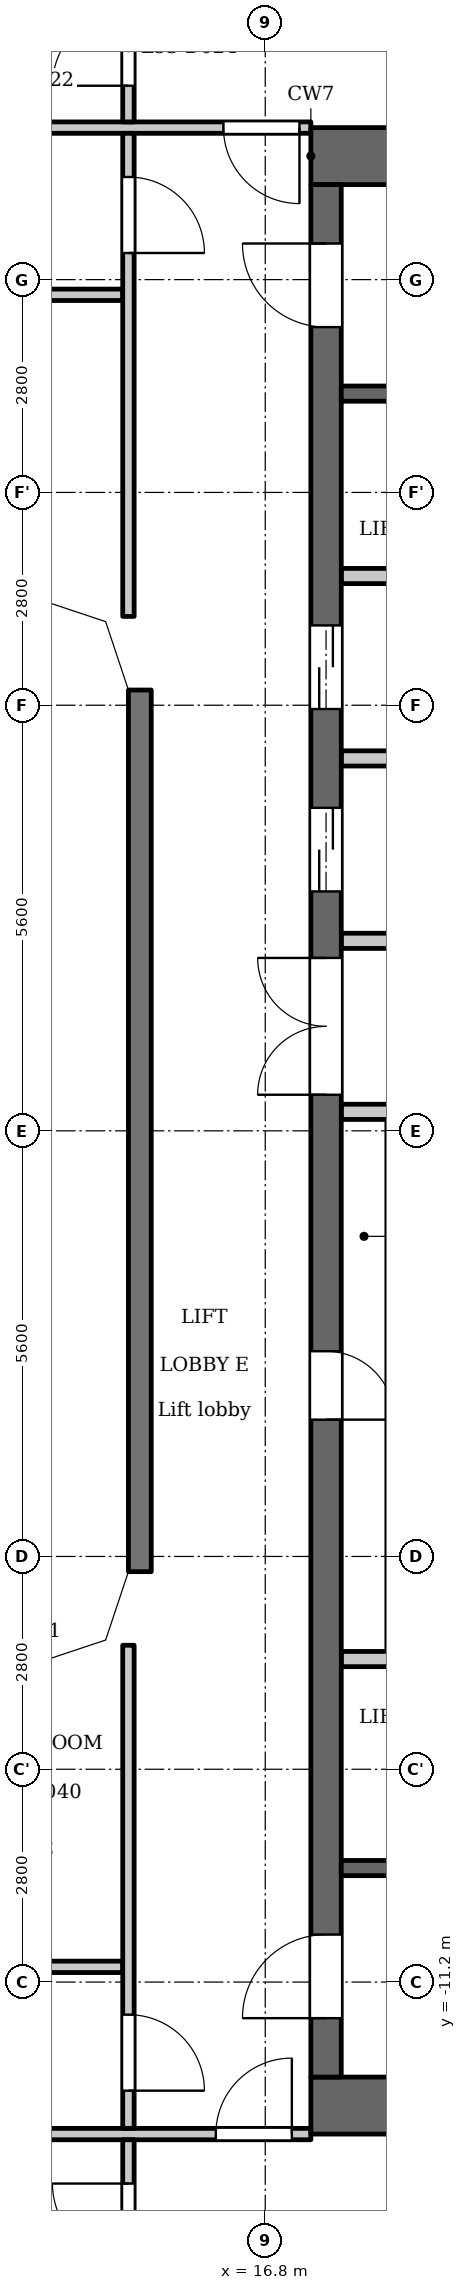
"""IFC4 building model, lengths in metres.
Left out: names, types, materials, properties, quantities, classifications, styles, units other than length and angle.
Written with IfcOpenShell. Run it as: python <this file> out.ifc"""

import sys

from ifc_helpers import new_model, si_unit, direction, frame, frame_2d, origin, place, context, subcontext, project, spatial, polyline, rectangle, outline, extrude, element, fill, save


model = new_model("IFC4")
c1 = context("Model", 3, precision=1e-05, world=origin(), true_north=direction((0.0, 1.0)))
c2 = subcontext(c1, "Body", "Model", "MODEL_VIEW")
j1 = project(units=[si_unit("LENGTHUNIT", "METRE"), si_unit("PLANEANGLEUNIT", "RADIAN")], contexts=[c1])
p1 = place(None, origin())
s1 = spatial("IfcSite", under=j1, at=p1, CompositionType="ELEMENT")
p2 = place(p1, origin())
s2 = spatial("IfcBuilding", under=s1, at=p2, CompositionType="ELEMENT")
p3 = place(p2, frame((0.0, 0.0, 206.4)))
s3 = spatial("IfcBuildingStorey", under=s2, at=p3, CompositionType="ELEMENT", Elevation=206.4)
p4 = place(p3, frame((15.15, 5.8, 0.0), z_axis=(0.0, 0.0, 1.0), x_axis=(0.0, -1.0, 0.0)))
e1 = element("IfcWall", 1, at=p4, inside=s3, PredefinedType="SOLIDWALL", context=c2, shape_type="SweptSolid", body=[
    extrude(rectangle(XDim=11.6, YDim=0.3, at=frame_2d((5.8, 0.0))), origin(), (0.0, 0.0, 1.0), 3.2),
])
for number, where, z_axis, x_axis in (
    (2, (17.4, 12.825, 0.0), (0.0, 0.0, 1.0), (1.0, 0.0, 0.0)),
    (3, (17.4, -12.825, 0.0), (0.0, 0.0, 1.0), (1.0, 0.0, 0.0)),
):
    element("IfcWall", number, at=place(p3, frame(where, z_axis=z_axis, x_axis=x_axis)), inside=s3, PredefinedType="SHEAR", context=c2, shape_type="SweptSolid", body=[
        extrude(rectangle(XDim=7.6, YDim=0.75, at=frame_2d((3.8, 0.0))), origin(), (0.0, 0.0, 1.0), 3.2),
    ])
p5 = place(p3, frame((17.6, -12.45, 0.0), z_axis=(0.0, 0.0, 1.0), x_axis=(0.0, 1.0, 0.0)))
e4 = element("IfcWall", 4, at=p5, inside=s3, PredefinedType="SHEAR", context=c2, shape_type="SweptSolid", body=[
    extrude(rectangle(XDim=24.9, YDim=0.4, at=frame_2d((12.45, 0.0))), origin(), (0.0, 0.0, 1.0), 3.2),
])
p6 = place(p5, frame((8.65, 0.0, 0.0)))
e5 = element("IfcOpeningElement", 5, at=p6, cuts=e4, PredefinedType="OPENING", context=c2, shape_type="SweptSolid", body=[
    extrude(rectangle(XDim=0.9, YDim=2.1, at=frame_2d((0.45, 1.05))), frame((0.0, 0.21, 0.0), z_axis=(0.0, -1.0, 0.0), x_axis=(1.0, 0.0, 0.0)), (0.0, 0.0, 1.0), 0.42),
])
p7 = place(p5, frame((15.6, 0.0, 0.0)))
e6 = element("IfcOpeningElement", 6, at=p7, cuts=e4, PredefinedType="OPENING", context=c2, shape_type="SweptSolid", body=[
    extrude(rectangle(XDim=1.1, YDim=2.1, at=frame_2d((0.55, 1.05))), frame((0.0, 0.21, 0.0), z_axis=(0.0, -1.0, 0.0), x_axis=(1.0, 0.0, 0.0)), (0.0, 0.0, 1.0), 0.42),
])
p8 = place(p5, frame((18.0, 0.0, 0.0)))
e7 = element("IfcOpeningElement", 7, at=p8, cuts=e4, PredefinedType="OPENING", context=c2, shape_type="SweptSolid", body=[
    extrude(rectangle(XDim=1.1, YDim=2.1, at=frame_2d((0.55, 1.05))), frame((0.0, 0.21, 0.0), z_axis=(0.0, -1.0, 0.0), x_axis=(1.0, 0.0, 0.0)), (0.0, 0.0, 1.0), 0.42),
])
p9 = place(p5, frame((23.025, 0.0, 0.0)))
e8 = element("IfcOpeningElement", 8, at=p9, cuts=e4, PredefinedType="OPENING", context=c2, shape_type="SweptSolid", body=[
    extrude(rectangle(XDim=1.1, YDim=2.1, at=frame_2d((0.55, 1.05))), frame((0.0, 0.21, 0.0), z_axis=(0.0, -1.0, 0.0), x_axis=(1.0, 0.0, 0.0)), (0.0, 0.0, 1.0), 0.42),
])
p10 = place(p5, frame((0.775, 0.0, 0.0)))
e9 = element("IfcOpeningElement", 9, at=p10, cuts=e4, PredefinedType="OPENING", context=c2, shape_type="SweptSolid", body=[
    extrude(rectangle(XDim=1.1, YDim=2.1, at=frame_2d((0.55, 1.05))), frame((0.0, 0.21, 0.0), z_axis=(0.0, -1.0, 0.0), x_axis=(1.0, 0.0, 0.0)), (0.0, 0.0, 1.0), 0.42),
])
p11 = place(p5, frame((12.925, 0.0, 0.0)))
e10 = element("IfcOpeningElement", 10, at=p11, cuts=e4, PredefinedType="OPENING", context=c2, shape_type="SweptSolid", body=[
    extrude(rectangle(XDim=1.8, YDim=2.1, at=frame_2d((0.9, 1.05))), frame((0.0, 0.21, 0.0), z_axis=(0.0, -1.0, 0.0), x_axis=(1.0, 0.0, 0.0)), (0.0, 0.0, 1.0), 0.42),
])
p12 = place(p3, frame((17.8, -9.7, 0.0), z_axis=(0.0, 0.0, 1.0), x_axis=(1.0, 0.0, 0.0)))
e11 = element("IfcWall", 11, at=p12, inside=s3, PredefinedType="SHEAR", context=c2, shape_type="SweptSolid", body=[
    extrude(rectangle(XDim=5.65, YDim=0.2, at=frame_2d((2.825, 0.0))), origin(), (0.0, 0.0, 1.0), 3.2),
])
p13 = place(p12, frame((0.85, 0.0, 0.0)))
e12 = element("IfcOpeningElement", 12, at=p13, cuts=e11, PredefinedType="OPENING", context=c2, shape_type="SweptSolid", body=[
    extrude(rectangle(XDim=1.1, YDim=2.1, at=frame_2d((0.55, 1.05))), frame((0.0, 0.11, 0.0), z_axis=(0.0, -1.0, 0.0), x_axis=(1.0, 0.0, 0.0)), (0.0, 0.0, 1.0), 0.22),
])
p14 = place(p12, frame((3.75, 0.0, 0.0)))
e13 = element("IfcOpeningElement", 13, at=p14, cuts=e11, PredefinedType="OPENING", context=c2, shape_type="SweptSolid", body=[
    extrude(rectangle(XDim=1.1, YDim=2.1, at=frame_2d((0.55, 1.05))), frame((0.0, 0.11, 0.0), z_axis=(0.0, -1.0, 0.0), x_axis=(1.0, 0.0, 0.0)), (0.0, 0.0, 1.0), 0.22),
])
p15 = place(p3, frame((17.8, -6.95, 0.0), z_axis=(0.0, 0.0, 1.0), x_axis=(1.0, 0.0, 0.0)))
e14 = element("IfcWall", 14, at=p15, inside=s3, PredefinedType="PARTITIONING", context=c2, shape_type="SweptSolid", body=[
    extrude(rectangle(XDim=2.8, YDim=0.2, at=frame_2d((1.4, 0.0))), origin(), (0.0, 0.0, 1.0), 3.2),
])
p16 = place(p3, frame((17.8, 0.25, 0.0), z_axis=(0.0, 0.0, 1.0), x_axis=(1.0, 0.0, 0.0)))
e15 = element("IfcWall", 15, at=p16, inside=s3, PredefinedType="PARTITIONING", context=c2, shape_type="SweptSolid", body=[
    extrude(rectangle(XDim=3.0, YDim=0.2, at=frame_2d((1.5, 0.0))), origin(), (0.0, 0.0, 1.0), 3.2),
])
p17 = place(p16, frame((1.35, 0.0, 0.0)))
e16 = element("IfcOpeningElement", 16, at=p17, cuts=e15, PredefinedType="OPENING", context=c2, shape_type="SweptSolid", body=[
    extrude(rectangle(XDim=0.9, YDim=2.1, at=frame_2d((0.45, 1.05))), frame((0.0, 0.11, 0.0), z_axis=(0.0, -1.0, 0.0), x_axis=(1.0, 0.0, 0.0)), (0.0, 0.0, 1.0), 0.22),
])
p18 = place(p3, frame((17.8, 2.5, 0.0), z_axis=(0.0, 0.0, 1.0), x_axis=(1.0, 0.0, 0.0)))
e17 = element("IfcWall", 17, at=p18, inside=s3, PredefinedType="PARTITIONING", context=c2, shape_type="SweptSolid", body=[
    extrude(rectangle(XDim=3.0, YDim=0.2, at=frame_2d((1.5, 0.0))), origin(), (0.0, 0.0, 1.0), 3.2),
])
for number, where, z_axis, x_axis in (
    (18, (17.8, 4.9, 0.0), (0.0, 0.0, 1.0), (1.0, 0.0, 0.0)),
    (19, (17.8, 7.3, 0.0), (0.0, 0.0, 1.0), (1.0, 0.0, 0.0)),
):
    element("IfcWall", number, at=place(p3, frame(where, z_axis=z_axis, x_axis=x_axis)), inside=s3, PredefinedType="PARTITIONING", context=c2, shape_type="SweptSolid", body=[
        extrude(rectangle(XDim=2.8, YDim=0.2, at=frame_2d((1.4, 0.0))), origin(), (0.0, 0.0, 1.0), 3.2),
    ])
p19 = place(p3, frame((17.8, 9.7, 0.0), z_axis=(0.0, 0.0, 1.0), x_axis=(1.0, 0.0, 0.0)))
e20 = element("IfcWall", 20, at=p19, inside=s3, PredefinedType="SHEAR", context=c2, shape_type="SweptSolid", body=[
    extrude(rectangle(XDim=5.65, YDim=0.2, at=frame_2d((2.825, 0.0))), origin(), (0.0, 0.0, 1.0), 3.2),
])
p20 = place(p19, frame((0.85, 0.0, 0.0)))
e21 = element("IfcOpeningElement", 21, at=p20, cuts=e20, PredefinedType="OPENING", context=c2, shape_type="SweptSolid", body=[
    extrude(rectangle(XDim=1.1, YDim=2.1, at=frame_2d((0.55, 1.05))), frame((0.0, 0.11, 0.0), z_axis=(0.0, -1.0, 0.0), x_axis=(1.0, 0.0, 0.0)), (0.0, 0.0, 1.0), 0.22),
])
p21 = place(p19, frame((3.75, 0.0, 0.0)))
e22 = element("IfcOpeningElement", 22, at=p21, cuts=e20, PredefinedType="OPENING", context=c2, shape_type="SweptSolid", body=[
    extrude(rectangle(XDim=1.1, YDim=2.1, at=frame_2d((0.55, 1.05))), frame((0.0, 0.11, 0.0), z_axis=(0.0, -1.0, 0.0), x_axis=(1.0, 0.0, 0.0)), (0.0, 0.0, 1.0), 0.22),
])
p22 = place(p3, frame((-17.4, -13.2, 0.0), z_axis=(0.0, 0.0, 1.0), x_axis=(1.0, 0.0, 0.0)))
e23 = element("IfcWall", 23, at=p22, inside=s3, PredefinedType="PARTITIONING", context=c2, shape_type="SweptSolid", body=[
    extrude(rectangle(XDim=34.8, YDim=0.15, at=frame_2d((17.4, 0.0))), origin(), (0.0, 0.0, 1.0), 3.2),
])
p23 = place(p22, frame((0.15, 0.0, 0.0)))
e24 = element("IfcOpeningElement", 24, at=p23, cuts=e23, PredefinedType="OPENING", context=c2, shape_type="SweptSolid", body=[
    extrude(rectangle(XDim=1.0, YDim=2.1, at=frame_2d((0.5, 1.05))), frame((0.0, 0.085, 0.0), z_axis=(0.0, -1.0, 0.0), x_axis=(1.0, 0.0, 0.0)), (0.0, 0.0, 1.0), 0.17),
])
p24 = place(p22, frame((33.55, 0.0, 0.0)))
e25 = element("IfcOpeningElement", 25, at=p24, cuts=e23, PredefinedType="OPENING", context=c2, shape_type="SweptSolid", body=[
    extrude(rectangle(XDim=1.0, YDim=2.1, at=frame_2d((0.5, 1.05))), frame((0.0, 0.085, 0.0), z_axis=(0.0, -1.0, 0.0), x_axis=(1.0, 0.0, 0.0)), (0.0, 0.0, 1.0), 0.17),
])
p25 = place(p3, frame((-14.925, -11.0, 0.0), z_axis=(0.0, 0.0, 1.0), x_axis=(1.0, 0.0, 0.0)))
e26 = element("IfcWall", 26, at=p25, inside=s3, PredefinedType="PARTITIONING", context=c2, shape_type="SweptSolid", body=[
    extrude(rectangle(XDim=29.85, YDim=0.15, at=frame_2d((14.925, 0.0))), origin(), (0.0, 0.0, 1.0), 3.2),
])
p26 = place(p25, frame((2.575, 0.0, 0.0)))
e27 = element("IfcOpeningElement", 27, at=p26, cuts=e26, PredefinedType="OPENING", context=c2, shape_type="SweptSolid", body=[
    extrude(rectangle(XDim=1.0, YDim=2.1, at=frame_2d((0.5, 1.05))), frame((0.0, 0.085, 0.0), z_axis=(0.0, -1.0, 0.0), x_axis=(1.0, 0.0, 0.0)), (0.0, 0.0, 1.0), 0.17),
])
p27 = place(p25, frame((26.375, 0.0, 0.0)))
e28 = element("IfcOpeningElement", 28, at=p27, cuts=e26, PredefinedType="OPENING", context=c2, shape_type="SweptSolid", body=[
    extrude(rectangle(XDim=1.0, YDim=2.1, at=frame_2d((0.5, 1.05))), frame((0.0, 0.085, 0.0), z_axis=(0.0, -1.0, 0.0), x_axis=(1.0, 0.0, 0.0)), (0.0, 0.0, 1.0), 0.17),
])
p28 = place(p3, frame((-14.925, 11.0, 0.0), z_axis=(0.0, 0.0, 1.0), x_axis=(1.0, 0.0, 0.0)))
e29 = element("IfcWall", 29, at=p28, inside=s3, PredefinedType="PARTITIONING", context=c2, shape_type="SweptSolid", body=[
    extrude(rectangle(XDim=29.85, YDim=0.15, at=frame_2d((14.925, 0.0))), origin(), (0.0, 0.0, 1.0), 3.2),
])
p29 = place(p28, frame((2.475, 0.0, 0.0)))
e30 = element("IfcOpeningElement", 30, at=p29, cuts=e29, PredefinedType="OPENING", context=c2, shape_type="SweptSolid", body=[
    extrude(rectangle(XDim=1.0, YDim=2.1, at=frame_2d((0.5, 1.05))), frame((0.0, 0.085, 0.0), z_axis=(0.0, -1.0, 0.0), x_axis=(1.0, 0.0, 0.0)), (0.0, 0.0, 1.0), 0.17),
])
p30 = place(p28, frame((17.975, 0.0, 0.0)))
e31 = element("IfcOpeningElement", 31, at=p30, cuts=e29, PredefinedType="OPENING", context=c2, shape_type="SweptSolid", body=[
    extrude(rectangle(XDim=1.0, YDim=2.1, at=frame_2d((0.5, 1.05))), frame((0.0, 0.085, 0.0), z_axis=(0.0, -1.0, 0.0), x_axis=(1.0, 0.0, 0.0)), (0.0, 0.0, 1.0), 0.17),
])
p31 = place(p3, frame((-17.4, 13.2, 0.0), z_axis=(0.0, 0.0, 1.0), x_axis=(1.0, 0.0, 0.0)))
e32 = element("IfcWall", 32, at=p31, inside=s3, PredefinedType="PARTITIONING", context=c2, shape_type="SweptSolid", body=[
    extrude(rectangle(XDim=34.8, YDim=0.15, at=frame_2d((17.4, 0.0))), origin(), (0.0, 0.0, 1.0), 3.2),
])
p32 = place(p31, frame((0.25, 0.0, 0.0)))
e33 = element("IfcOpeningElement", 33, at=p32, cuts=e32, PredefinedType="OPENING", context=c2, shape_type="SweptSolid", body=[
    extrude(rectangle(XDim=1.0, YDim=2.1, at=frame_2d((0.5, 1.05))), frame((0.0, 0.085, 0.0), z_axis=(0.0, -1.0, 0.0), x_axis=(1.0, 0.0, 0.0)), (0.0, 0.0, 1.0), 0.17),
])
p33 = place(p31, frame((33.65, 0.0, 0.0)))
e34 = element("IfcOpeningElement", 34, at=p33, cuts=e32, PredefinedType="OPENING", context=c2, shape_type="SweptSolid", body=[
    extrude(rectangle(XDim=1.0, YDim=2.1, at=frame_2d((0.5, 1.05))), frame((0.0, 0.085, 0.0), z_axis=(0.0, -1.0, 0.0), x_axis=(1.0, 0.0, 0.0)), (0.0, 0.0, 1.0), 0.17),
])
p34 = place(p3, frame((15.0, -15.325, 0.0), z_axis=(0.0, 0.0, 1.0), x_axis=(0.0, 1.0, 0.0)))
e35 = element("IfcWall", 35, at=p34, inside=s3, PredefinedType="PARTITIONING", context=c2, shape_type="SweptSolid", body=[
    extrude(rectangle(XDim=2.05, YDim=0.15, at=frame_2d((1.025, 0.0))), origin(), (0.0, 0.0, 1.0), 3.2),
])
p35 = place(p34, frame((0.474, 0.0, 0.0)))
e36 = element("IfcOpeningElement", 36, at=p35, cuts=e35, PredefinedType="OPENING", context=c2, shape_type="SweptSolid", body=[
    extrude(rectangle(XDim=1.0, YDim=2.1, at=frame_2d((0.5, 1.05))), frame((0.0, 0.085, 0.0), z_axis=(0.0, -1.0, 0.0), x_axis=(1.0, 0.0, 0.0)), (0.0, 0.0, 1.0), 0.17),
])
p36 = place(p3, frame((15.0, -13.125, 0.0), z_axis=(0.0, 0.0, 1.0), x_axis=(0.0, 1.0, 0.0)))
e37 = element("IfcWall", 37, at=p36, inside=s3, PredefinedType="PARTITIONING", context=c2, shape_type="SweptSolid", body=[
    extrude(rectangle(XDim=6.356, YDim=0.15, at=frame_2d((3.178, 0.0))), origin(), (0.0, 0.0, 1.0), 3.2),
])
p37 = place(p36, frame((0.496, 0.0, 0.0)))
e38 = element("IfcOpeningElement", 38, at=p37, cuts=e37, PredefinedType="OPENING", context=c2, shape_type="SweptSolid", body=[
    extrude(rectangle(XDim=1.0, YDim=2.1, at=frame_2d((0.5, 1.05))), frame((0.0, 0.085, 0.0), z_axis=(0.0, -1.0, 0.0), x_axis=(1.0, 0.0, 0.0)), (0.0, 0.0, 1.0), 0.17),
])
p38 = place(p3, frame((15.0, 6.769, 0.0), z_axis=(0.0, 0.0, 1.0), x_axis=(0.0, 1.0, 0.0)))
e39 = element("IfcWall", 39, at=p38, inside=s3, PredefinedType="PARTITIONING", context=c2, shape_type="SweptSolid", body=[
    extrude(rectangle(XDim=6.356, YDim=0.15, at=frame_2d((3.178, 0.0))), origin(), (0.0, 0.0, 1.0), 3.2),
])
p39 = place(p38, frame((4.781, 0.0, 0.0)))
e40 = element("IfcOpeningElement", 40, at=p39, cuts=e39, PredefinedType="OPENING", context=c2, shape_type="SweptSolid", body=[
    extrude(rectangle(XDim=1.0, YDim=2.1, at=frame_2d((0.5, 1.05))), frame((0.0, 0.085, 0.0), z_axis=(0.0, -1.0, 0.0), x_axis=(1.0, 0.0, 0.0)), (0.0, 0.0, 1.0), 0.17),
])
p40 = place(p3, frame((15.0, 13.275, 0.0), z_axis=(0.0, 0.0, 1.0), x_axis=(0.0, 1.0, 0.0)))
e41 = element("IfcWall", 41, at=p40, inside=s3, PredefinedType="PARTITIONING", context=c2, shape_type="SweptSolid", body=[
    extrude(rectangle(XDim=2.05, YDim=0.15, at=frame_2d((1.025, 0.0))), origin(), (0.0, 0.0, 1.0), 3.2),
])
p41 = place(p40, frame((0.476, 0.0, 0.0)))
e42 = element("IfcOpeningElement", 42, at=p41, cuts=e41, PredefinedType="OPENING", context=c2, shape_type="SweptSolid", body=[
    extrude(rectangle(XDim=1.0, YDim=2.1, at=frame_2d((0.5, 1.05))), frame((0.0, 0.085, 0.0), z_axis=(0.0, -1.0, 0.0), x_axis=(1.0, 0.0, 0.0)), (0.0, 0.0, 1.0), 0.17),
])
p42 = place(p3, origin())
e43 = element("IfcWall", 43, at=p42, inside=s3, PredefinedType="SOLIDWALL", context=c2, shape_type="SweptSolid", body=[
    extrude(outline(polyline([(14.937, 6.937), (13.849, 7.3), (13.8, 7.3), (13.8, 7.0), (14.7, 6.7), (15.0, 5.8), (15.3, 5.8), (15.3, 5.849), (14.937, 6.937)])), origin(), (0.0, 0.0, 1.0), 3.2),
])
e44 = element("IfcWall", 44, at=p42, inside=s3, PredefinedType="SOLIDWALL", context=c2, shape_type="SweptSolid", body=[
    extrude(outline(polyline([(14.937, -6.937), (15.3, -5.849), (15.3, -5.8), (15.0, -5.8), (14.7, -6.7), (13.8, -7.0), (13.8, -7.3), (13.849, -7.3), (14.937, -6.937)])), origin(), (0.0, 0.0, 1.0), 3.2),
])
p43 = place(p6, origin())
e45 = element("IfcDoor", 45, at=p43, inside=s3, OperationType="SINGLE_SWING_LEFT", PredefinedType="DOOR", context=c2, shape_type="SweptSolid", body=[
    extrude(rectangle(XDim=0.9, YDim=2.1, at=frame_2d((0.45, 1.05))), frame((0.0, 0.025, 0.0), z_axis=(0.0, -1.0, 0.0), x_axis=(1.0, 0.0, 0.0)), (0.0, 0.0, 1.0), 0.05),
])
fill(e5, e45)
p44 = place(p7, origin())
e46 = element("IfcDoor", 46, at=p44, inside=s3, OperationType="DOUBLE_DOOR_SLIDING", PredefinedType="DOOR", context=c2, shape_type="SweptSolid", body=[
    extrude(rectangle(XDim=1.1, YDim=2.1, at=frame_2d((0.55, 1.05))), frame((0.0, 0.025, 0.0), z_axis=(0.0, -1.0, 0.0), x_axis=(1.0, 0.0, 0.0)), (0.0, 0.0, 1.0), 0.05),
])
fill(e6, e46)
p45 = place(p8, origin())
e47 = element("IfcDoor", 47, at=p45, inside=s3, OperationType="DOUBLE_DOOR_SLIDING", PredefinedType="DOOR", context=c2, shape_type="SweptSolid", body=[
    extrude(rectangle(XDim=1.1, YDim=2.1, at=frame_2d((0.55, 1.05))), frame((0.0, 0.025, 0.0), z_axis=(0.0, -1.0, 0.0), x_axis=(1.0, 0.0, 0.0)), (0.0, 0.0, 1.0), 0.05),
])
fill(e7, e47)
p46 = place(p9, origin())
e48 = element("IfcDoor", 48, at=p46, inside=s3, OperationType="SINGLE_SWING_LEFT", PredefinedType="DOOR", context=c2, shape_type="SweptSolid", body=[
    extrude(rectangle(XDim=1.1, YDim=2.1, at=frame_2d((0.55, 1.05))), frame((0.0, 0.025, 0.0), z_axis=(0.0, -1.0, 0.0), x_axis=(1.0, 0.0, 0.0)), (0.0, 0.0, 1.0), 0.05),
])
fill(e8, e48)
p47 = place(p10, origin())
e49 = element("IfcDoor", 49, at=p47, inside=s3, OperationType="SINGLE_SWING_RIGHT", PredefinedType="DOOR", context=c2, shape_type="SweptSolid", body=[
    extrude(rectangle(XDim=1.1, YDim=2.1, at=frame_2d((0.55, 1.05))), frame((0.0, 0.025, 0.0), z_axis=(0.0, -1.0, 0.0), x_axis=(1.0, 0.0, 0.0)), (0.0, 0.0, 1.0), 0.05),
])
fill(e9, e49)
p48 = place(p11, origin())
e50 = element("IfcDoor", 50, at=p48, inside=s3, OperationType="DOUBLE_DOOR_SINGLE_SWING", PredefinedType="DOOR", context=c2, shape_type="SweptSolid", body=[
    extrude(rectangle(XDim=1.8, YDim=2.1, at=frame_2d((0.9, 1.05))), frame((0.0, 0.025, 0.0), z_axis=(0.0, -1.0, 0.0), x_axis=(1.0, 0.0, 0.0)), (0.0, 0.0, 1.0), 0.05),
])
fill(e10, e50)
p49 = place(p39, origin())
e51 = element("IfcDoor", 51, at=p49, inside=s3, OperationType="SINGLE_SWING_LEFT", PredefinedType="DOOR", context=c2, shape_type="SweptSolid", body=[
    extrude(rectangle(XDim=1.0, YDim=2.1, at=frame_2d((0.5, 1.05))), frame((0.0, 0.025, 0.0), z_axis=(0.0, -1.0, 0.0), x_axis=(1.0, 0.0, 0.0)), (0.0, 0.0, 1.0), 0.05),
])
fill(e40, e51)
p50 = place(p33, origin())
e52 = element("IfcDoor", 52, at=p50, inside=s3, OperationType="SINGLE_SWING_RIGHT", PredefinedType="DOOR", context=c2, shape_type="SweptSolid", body=[
    extrude(rectangle(XDim=1.0, YDim=2.1, at=frame_2d((0.5, 1.05))), frame((0.0, 0.025, 0.0), z_axis=(0.0, -1.0, 0.0), x_axis=(1.0, 0.0, 0.0)), (0.0, 0.0, 1.0), 0.05),
])
fill(e34, e52)
p51 = place(p37, origin())
e53 = element("IfcDoor", 53, at=p51, inside=s3, OperationType="SINGLE_SWING_LEFT", PredefinedType="DOOR", context=c2, shape_type="SweptSolid", body=[
    extrude(rectangle(XDim=1.0, YDim=2.1, at=frame_2d((0.5, 1.05))), frame((0.0, 0.025, 0.0), z_axis=(0.0, -1.0, 0.0), x_axis=(1.0, 0.0, 0.0)), (0.0, 0.0, 1.0), 0.05),
])
fill(e38, e53)
p52 = place(p24, origin())
e54 = element("IfcDoor", 54, at=p52, inside=s3, OperationType="SINGLE_SWING_LEFT", PredefinedType="DOOR", context=c2, shape_type="SweptSolid", body=[
    extrude(rectangle(XDim=1.0, YDim=2.1, at=frame_2d((0.5, 1.05))), frame((0.0, 0.025, 0.0), z_axis=(0.0, -1.0, 0.0), x_axis=(1.0, 0.0, 0.0)), (0.0, 0.0, 1.0), 0.05),
])
fill(e25, e54)
p53 = place(p41, origin())
e55 = element("IfcDoor", 55, at=p53, inside=s3, OperationType="SINGLE_SWING_RIGHT", PredefinedType="DOOR", context=c2, shape_type="SweptSolid", body=[
    extrude(rectangle(XDim=1.0, YDim=2.1, at=frame_2d((0.5, 1.05))), frame((0.0, 0.025, 0.0), z_axis=(0.0, -1.0, 0.0), x_axis=(1.0, 0.0, 0.0)), (0.0, 0.0, 1.0), 0.05),
])
fill(e42, e55)
p54 = place(p35, origin())
e56 = element("IfcDoor", 56, at=p54, inside=s3, OperationType="SINGLE_SWING_LEFT", PredefinedType="DOOR", context=c2, shape_type="SweptSolid", body=[
    extrude(rectangle(XDim=1.0, YDim=2.1, at=frame_2d((0.5, 1.05))), frame((0.0, 0.025, 0.0), z_axis=(0.0, -1.0, 0.0), x_axis=(1.0, 0.0, 0.0)), (0.0, 0.0, 1.0), 0.05),
])
fill(e36, e56)
save(model, sys.argv[1])
